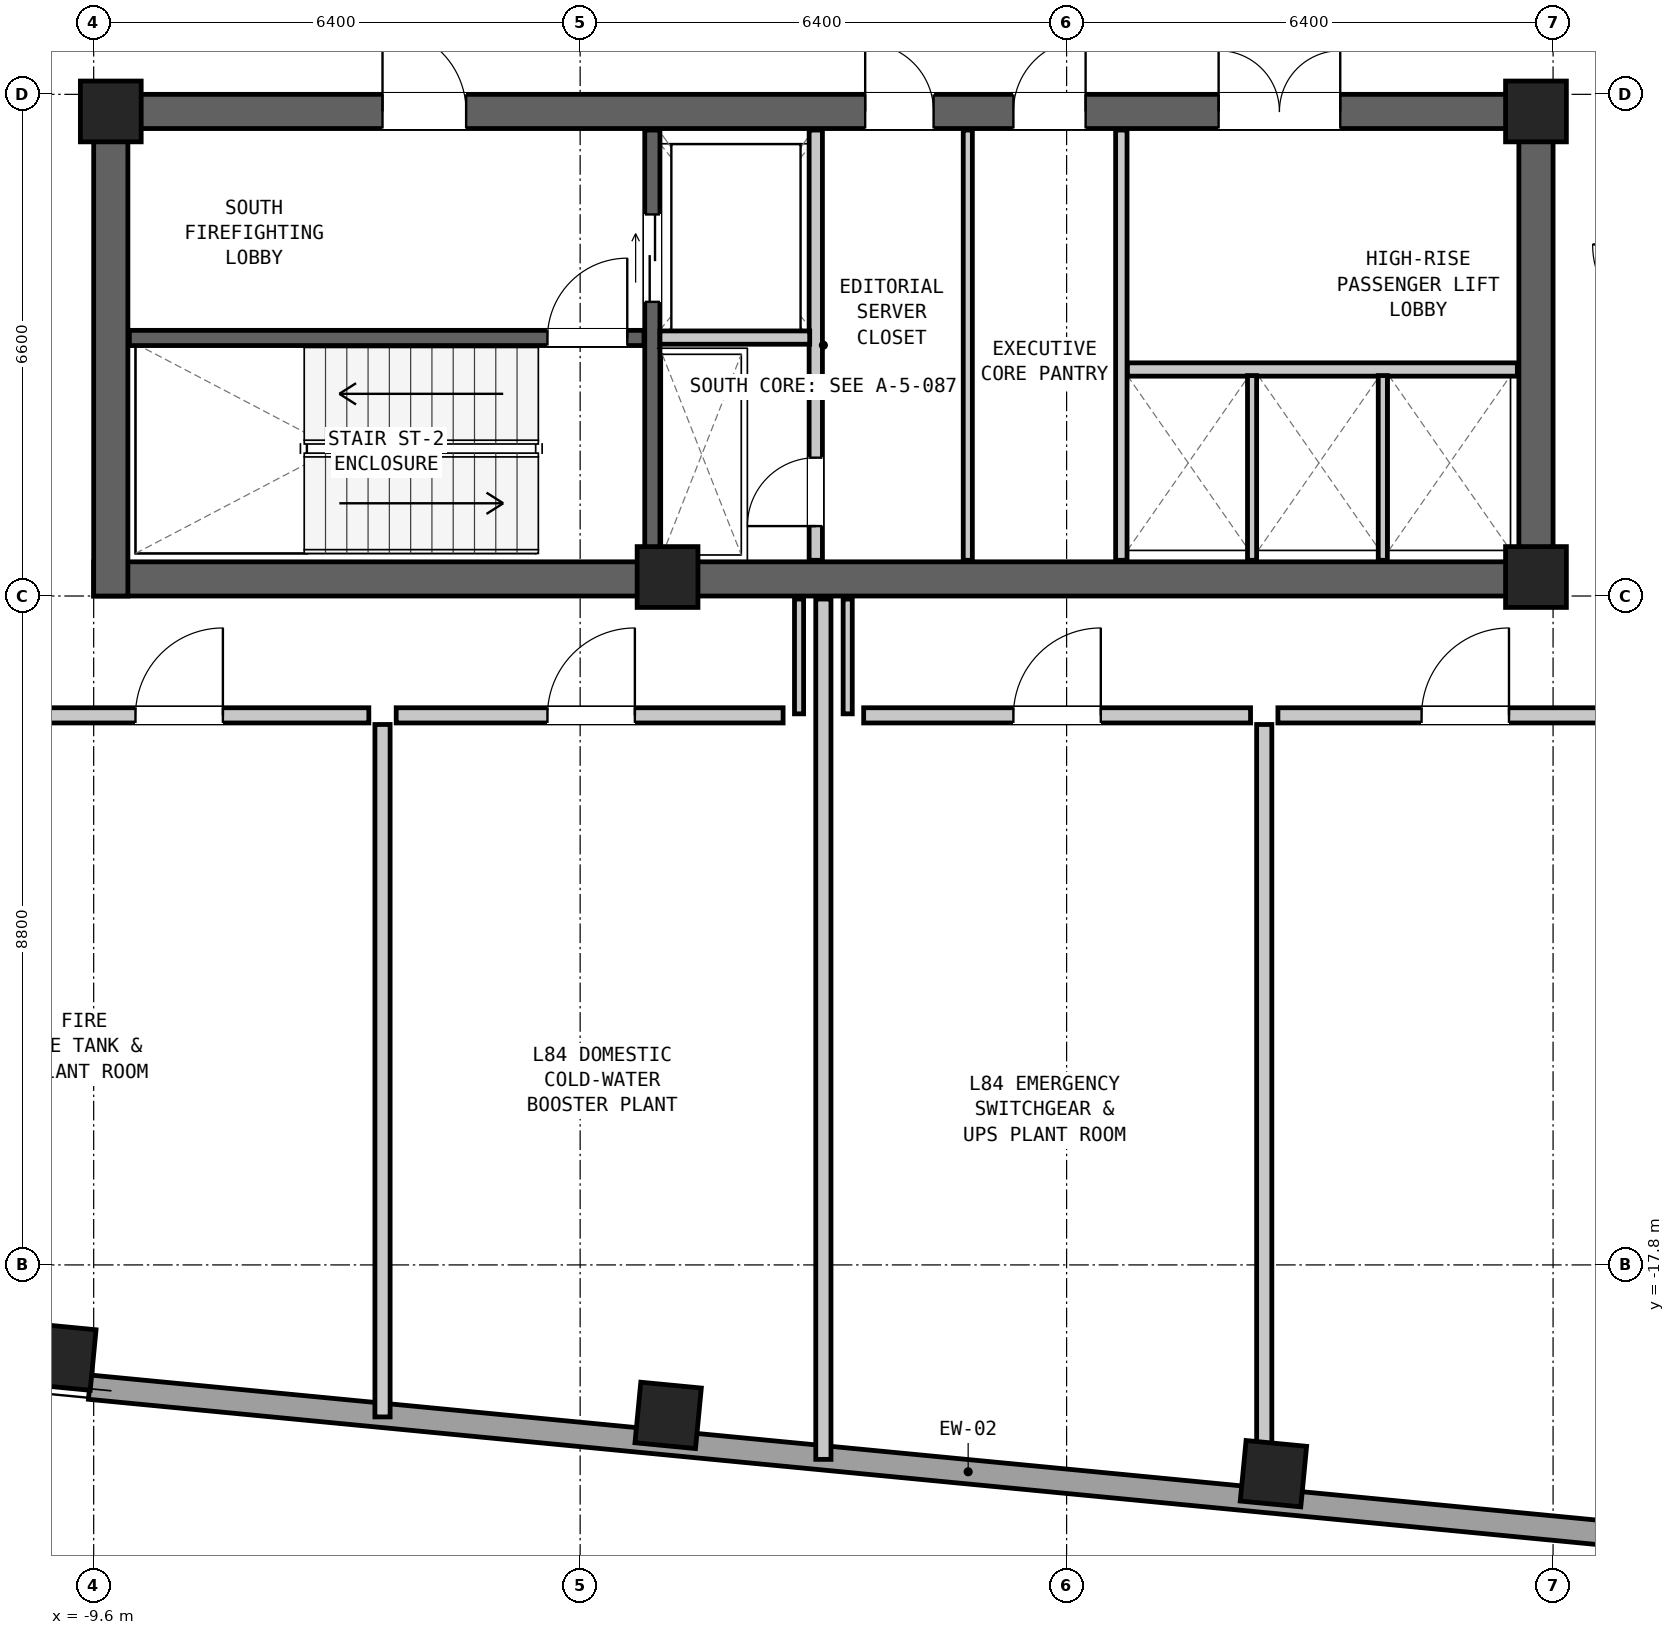
"""IFC4 building model, lengths in metres.
Left out: names, types, materials, properties, quantities, classifications, styles, units other than length and angle.
Written with IfcOpenShell. Run it as: python <this file> out.ifc"""

import sys

from ifc_helpers import new_model, si_unit, direction, frame, frame_2d, origin, origin_2d, place, context, subcontext, project, spatial, rectangle, extrude, element, fill, save


model = new_model("IFC4")
c1 = context("Model", 3, precision=1e-05, world=origin(), true_north=direction((0.0, 1.0)))
c2 = subcontext(c1, "Body", "Model", "MODEL_VIEW")
j1 = project(units=[si_unit("LENGTHUNIT", "METRE"), si_unit("PLANEANGLEUNIT", "RADIAN")], contexts=[c1])
p1 = place(None, origin())
s1 = spatial("IfcSite", under=j1, at=p1, CompositionType="ELEMENT")
p2 = place(p1, origin())
s2 = spatial("IfcBuilding", under=s1, at=p2, CompositionType="ELEMENT")
p3 = place(p2, frame((0.0, 0.0, 284.9)))
s3 = spatial("IfcBuildingStorey", under=s2, at=p3, CompositionType="ELEMENT", Elevation=284.9)
p4 = place(p3, frame((-9.6, -8.775, 0.0), z_axis=(0.0, 0.0, 1.0), x_axis=(1.0, 0.0, 0.0)))
e1 = element("IfcWall", 1, at=p4, inside=s3, PredefinedType="SHEAR", context=c2, shape_type="SweptSolid", body=[
    extrude(rectangle(XDim=19.2, YDim=0.45, at=frame_2d((9.6, 0.0))), origin(), (0.0, 0.0, 1.0), 4.35),
])
p5 = place(p3, frame((-9.6, -2.625, 0.0), z_axis=(0.0, 0.0, 1.0), x_axis=(1.0, 0.0, 0.0)))
e2 = element("IfcWall", 2, at=p5, inside=s3, PredefinedType="SHEAR", context=c2, shape_type="SweptSolid", body=[
    extrude(rectangle(XDim=19.2, YDim=0.45, at=frame_2d((9.6, 0.0))), origin(), (0.0, 0.0, 1.0), 4.35),
])
p6 = place(p5, frame((3.8, 0.0, 0.0)))
e3 = element("IfcOpeningElement", 3, at=p6, cuts=e2, PredefinedType="OPENING", context=c2, shape_type="SweptSolid", body=[
    extrude(rectangle(XDim=1.1, YDim=2.08, at=frame_2d((0.55, 1.04))), frame((0.0, 0.237, 0.0), z_axis=(0.0, -1.0, 0.0), x_axis=(1.0, 0.0, 0.0)), (0.0, 0.0, 1.0), 0.474),
])
p7 = place(p5, frame((10.15, 0.0, 0.0)))
e4 = element("IfcOpeningElement", 4, at=p7, cuts=e2, PredefinedType="OPENING", context=c2, shape_type="SweptSolid", body=[
    extrude(rectangle(XDim=0.9, YDim=2.05, at=frame_2d((0.45, 1.025))), frame((0.0, 0.237, 0.0), z_axis=(0.0, -1.0, 0.0), x_axis=(1.0, 0.0, 0.0)), (0.0, 0.0, 1.0), 0.474),
])
p8 = place(p5, frame((12.1, 0.0, 0.0)))
e5 = element("IfcOpeningElement", 5, at=p8, cuts=e2, PredefinedType="OPENING", context=c2, shape_type="SweptSolid", body=[
    extrude(rectangle(XDim=0.95, YDim=2.1, at=frame_2d((0.475, 1.05))), frame((0.0, 0.237, 0.0), z_axis=(0.0, -1.0, 0.0), x_axis=(1.0, 0.0, 0.0)), (0.0, 0.0, 1.0), 0.474),
])
p9 = place(p5, frame((14.8, 0.0, 0.0)))
e6 = element("IfcOpeningElement", 6, at=p9, cuts=e2, PredefinedType="OPENING", context=c2, shape_type="SweptSolid", body=[
    extrude(rectangle(XDim=1.6, YDim=2.12, at=frame_2d((0.8, 1.06))), frame((0.0, 0.237, 0.0), z_axis=(0.0, -1.0, 0.0), x_axis=(1.0, 0.0, 0.0)), (0.0, 0.0, 1.0), 0.474),
])
for number, where, z_axis, x_axis in (
    (7, (-9.375, -9.0, 0.0), (0.0, 0.0, 1.0), (0.0, 1.0, 0.0)),
    (8, (9.375, -9.0, 0.0), (0.0, 0.0, 1.0), (0.0, 1.0, 0.0)),
):
    element("IfcWall", number, at=place(p3, frame(where, z_axis=z_axis, x_axis=x_axis)), inside=s3, PredefinedType="SHEAR", context=c2, shape_type="SweptSolid", body=[
        extrude(rectangle(XDim=6.6, YDim=0.45, at=frame_2d((3.3, 0.0))), origin(), (0.0, 0.0, 1.0), 4.35),
    ])
for number, where, z_axis, x_axis in (
    (9, (-10.005, -19.013, 0.0), (0.0, 0.0, 1.0), (0.995, -0.096, 0.0)),
    (10, (-2.042, -19.78, 0.0), (0.0, 0.0, 1.0), (0.995, -0.096, 0.0)),
    (11, (5.921, -20.546, 0.0), (0.0, 0.0, 1.0), (0.995, -0.096, 0.0)),
    (12, (-9.375, -2.625, 0.0), (0.0, 0.0, 1.0), (1.0, 0.0, 0.0)),
    (13, (9.375, -2.625, 0.0), (0.0, 0.0, 1.0), (1.0, 0.0, 0.0)),
    (14, (-2.05, -8.75, 0.0), (0.0, 0.0, 1.0), (1.0, 0.0, 0.0)),
    (15, (9.375, -8.75, 0.0), (0.0, 0.0, 1.0), (1.0, 0.0, 0.0)),
):
    element("IfcColumn", number, at=place(p3, frame(where, z_axis=z_axis, x_axis=x_axis)), inside=s3, PredefinedType="COLUMN", context=c2, shape_type="SweptSolid", body=[
        extrude(rectangle(XDim=0.8, YDim=0.8, at=origin_2d()), origin(), (0.0, 0.0, 1.0), 4.35),
    ])
p10 = place(p3, frame((13.463, -21.635, 0.0), z_axis=(0.0, 0.0, 1.0), x_axis=(-0.995395614039, 0.095851820809, 0.0)))
e16 = element("IfcWall", 16, at=p10, inside=s3, PredefinedType="SOLIDWALL", context=c2, shape_type="SweptSolid", body=[
    extrude(rectangle(XDim=23.224, YDim=0.32, at=frame_2d((11.612, 0.0))), origin(), (0.0, 0.0, 1.0), 2.25),
])
p11 = place(p3, frame((-9.13, -5.605, 0.0), z_axis=(0.0, 0.0, 1.0), x_axis=(1.0, 0.0, 0.0)))
e17 = element("IfcWall", 17, at=p11, inside=s3, PredefinedType="SHEAR", context=c2, shape_type="SweptSolid", body=[
    extrude(rectangle(XDim=6.77, YDim=0.2, at=frame_2d((3.385, 0.0))), origin(), (0.0, 0.0, 1.0), 4.07),
])
p12 = place(p11, frame((5.5, 0.0, 0.0)))
e18 = element("IfcOpeningElement", 18, at=p12, cuts=e17, PredefinedType="OPENING", context=c2, shape_type="SweptSolid", body=[
    extrude(rectangle(XDim=1.05, YDim=2.08, at=frame_2d((0.525, 1.04))), frame((0.0, 0.112, 0.0), z_axis=(0.0, -1.0, 0.0), x_axis=(1.0, 0.0, 0.0)), (0.0, 0.0, 1.0), 0.224),
])
p13 = place(p3, frame((-2.25, -8.53, 0.0), z_axis=(0.0, 0.0, 1.0), x_axis=(0.0, 1.0, 0.0)))
e19 = element("IfcWall", 19, at=p13, inside=s3, PredefinedType="SHEAR", context=c2, shape_type="SweptSolid", body=[
    extrude(rectangle(XDim=5.66, YDim=0.2, at=frame_2d((2.83, 0.0))), origin(), (0.0, 0.0, 1.0), 4.07),
])
p14 = place(p13, frame((3.4, 0.0, 0.0)))
e20 = element("IfcOpeningElement", 20, at=p14, cuts=e19, PredefinedType="OPENING", context=c2, shape_type="SweptSolid", body=[
    extrude(rectangle(XDim=1.15, YDim=2.08, at=frame_2d((0.575, 1.04))), frame((0.0, 0.112, 0.0), z_axis=(0.0, -1.0, 0.0), x_axis=(1.0, 0.0, 0.0)), (0.0, 0.0, 1.0), 0.224),
])
p15 = place(p3, frame((-0.1, -8.53, 0.0), z_axis=(0.0, 0.0, 1.0), x_axis=(0.0, 1.0, 0.0)))
e21 = element("IfcWall", 21, at=p15, inside=s3, PredefinedType="PARTITIONING", context=c2, shape_type="SweptSolid", body=[
    extrude(rectangle(XDim=5.66, YDim=0.175, at=frame_2d((2.83, 0.0))), origin(), (0.0, 0.0, 1.0), 4.07),
])
p16 = place(p15, frame((0.45, 0.0, 0.0)))
e22 = element("IfcOpeningElement", 22, at=p16, cuts=e21, PredefinedType="OPENING", context=c2, shape_type="SweptSolid", body=[
    extrude(rectangle(XDim=0.9, YDim=2.05, at=frame_2d((0.45, 1.025))), frame((0.0, 0.1, 0.0), z_axis=(0.0, -1.0, 0.0), x_axis=(1.0, 0.0, 0.0)), (0.0, 0.0, 1.0), 0.199),
])
p17 = place(p3, frame((-2.15, -5.6, 0.0), z_axis=(0.0, 0.0, 1.0), x_axis=(1.0, 0.0, 0.0)))
e23 = element("IfcWall", 23, at=p17, inside=s3, PredefinedType="PARTITIONING", context=c2, shape_type="SweptSolid", body=[
    extrude(rectangle(XDim=1.97, YDim=0.175, at=frame_2d((0.985, 0.0))), origin(), (0.0, 0.0, 1.0), 4.07),
])
p18 = place(p3, frame((3.92, -8.53, 0.0), z_axis=(0.0, 0.0, 1.0), x_axis=(0.0, 1.0, 0.0)))
e24 = element("IfcWall", 24, at=p18, inside=s3, PredefinedType="PARTITIONING", context=c2, shape_type="SweptSolid", body=[
    extrude(rectangle(XDim=5.66, YDim=0.15, at=frame_2d((2.83, 0.0))), origin(), (0.0, 0.0, 1.0), 4.07),
])
p19 = place(p3, frame((1.9, -8.53, 0.0), z_axis=(0.0, 0.0, 1.0), x_axis=(0.0, 1.0, 0.0)))
e25 = element("IfcWall", 25, at=p19, inside=s3, PredefinedType="PARTITIONING", context=c2, shape_type="SweptSolid", body=[
    extrude(rectangle(XDim=5.66, YDim=0.12, at=frame_2d((2.83, 0.0))), origin(), (0.0, 0.0, 1.0), 4.07),
])
p20 = place(p3, frame((4.0, -6.02, 0.0), z_axis=(0.0, 0.0, 1.0), x_axis=(1.0, 0.0, 0.0)))
e26 = element("IfcWall", 26, at=p20, inside=s3, PredefinedType="PARTITIONING", context=c2, shape_type="SweptSolid", body=[
    extrude(rectangle(XDim=5.13, YDim=0.175, at=frame_2d((2.565, 0.0))), origin(), (0.0, 0.0, 1.0), 4.07),
])
for number, where, z_axis, x_axis in (
    (27, (5.64, -8.53, 0.0), (0.0, 0.0, 1.0), (0.0, 1.0, 0.0)),
    (28, (7.36, -8.53, 0.0), (0.0, 0.0, 1.0), (0.0, 1.0, 0.0)),
):
    element("IfcWall", number, at=place(p3, frame(where, z_axis=z_axis, x_axis=x_axis)), inside=s3, PredefinedType="PARTITIONING", context=c2, shape_type="SweptSolid", body=[
        extrude(rectangle(XDim=2.43, YDim=0.12, at=frame_2d((1.215, 0.0))), origin(), (0.0, 0.0, 1.0), 4.07),
    ])
p21 = place(p3, frame((0.0, -20.358, 0.0), z_axis=(0.0, 0.0, 1.0), x_axis=(0.0, 1.0, 0.0)))
e29 = element("IfcWall", 29, at=p21, inside=s3, PredefinedType="PARTITIONING", context=c2, shape_type="SweptSolid", body=[
    extrude(rectangle(XDim=11.318, YDim=0.2, at=frame_2d((5.659, 0.0))), origin(), (0.0, 0.0, 1.0), 2.25),
])
for number, where, z_axis, x_axis in (
    (30, (-0.32, -10.55, 0.0), (0.0, 0.0, 1.0), (0.0, 1.0, 0.0)),
    (31, (0.32, -10.55, 0.0), (0.0, 0.0, 1.0), (0.0, 1.0, 0.0)),
):
    element("IfcWall", number, at=place(p3, frame(where, z_axis=z_axis, x_axis=x_axis)), inside=s3, PredefinedType="PARTITIONING", context=c2, shape_type="SweptSolid", body=[
        extrude(rectangle(XDim=1.51, YDim=0.12, at=frame_2d((0.755, 0.0))), origin(), (0.0, 0.0, 1.0), 2.25),
    ])
p22 = place(p3, frame((-10.97, -10.57, 0.0), z_axis=(0.0, 0.0, 1.0), x_axis=(1.0, 0.0, 0.0)))
e32 = element("IfcWall", 32, at=p22, inside=s3, PredefinedType="PARTITIONING", context=c2, shape_type="SweptSolid", body=[
    extrude(rectangle(XDim=4.99, YDim=0.2, at=frame_2d((2.495, 0.0))), origin(), (0.0, 0.0, 1.0), 4.07),
])
p23 = place(p22, frame((1.92, 0.0, 0.0)))
e33 = element("IfcOpeningElement", 33, at=p23, cuts=e32, PredefinedType="OPENING", context=c2, shape_type="SweptSolid", body=[
    extrude(rectangle(XDim=1.15, YDim=2.1, at=frame_2d((0.575, 1.05))), frame((0.0, 0.112, 0.0), z_axis=(0.0, -1.0, 0.0), x_axis=(1.0, 0.0, 0.0)), (0.0, 0.0, 1.0), 0.224),
])
p24 = place(p3, frame((-5.8, -19.8, 0.0), z_axis=(0.0, 0.0, 1.0), x_axis=(0.0, 1.0, 0.0)))
e34 = element("IfcWall", 34, at=p24, inside=s3, PredefinedType="PARTITIONING", context=c2, shape_type="SweptSolid", body=[
    extrude(rectangle(XDim=9.11, YDim=0.2, at=frame_2d((4.555, 0.0))), origin(), (0.0, 0.0, 1.0), 3.288),
])
p25 = place(p3, frame((-5.62, -10.57, 0.0), z_axis=(0.0, 0.0, 1.0), x_axis=(1.0, 0.0, 0.0)))
e35 = element("IfcWall", 35, at=p25, inside=s3, PredefinedType="PARTITIONING", context=c2, shape_type="SweptSolid", body=[
    extrude(rectangle(XDim=5.09, YDim=0.2, at=frame_2d((2.545, 0.0))), origin(), (0.0, 0.0, 1.0), 4.07),
])
p26 = place(p25, frame((1.99, 0.0, 0.0)))
e36 = element("IfcOpeningElement", 36, at=p26, cuts=e35, PredefinedType="OPENING", context=c2, shape_type="SweptSolid", body=[
    extrude(rectangle(XDim=1.15, YDim=2.1, at=frame_2d((0.575, 1.05))), frame((0.0, 0.112, 0.0), z_axis=(0.0, -1.0, 0.0), x_axis=(1.0, 0.0, 0.0)), (0.0, 0.0, 1.0), 0.224),
])
p27 = place(p3, frame((0.53, -10.57, 0.0), z_axis=(0.0, 0.0, 1.0), x_axis=(1.0, 0.0, 0.0)))
e37 = element("IfcWall", 37, at=p27, inside=s3, PredefinedType="PARTITIONING", context=c2, shape_type="SweptSolid", body=[
    extrude(rectangle(XDim=5.09, YDim=0.2, at=frame_2d((2.545, 0.0))), origin(), (0.0, 0.0, 1.0), 4.07),
])
p28 = place(p27, frame((1.97, 0.0, 0.0)))
e38 = element("IfcOpeningElement", 38, at=p28, cuts=e37, PredefinedType="OPENING", context=c2, shape_type="SweptSolid", body=[
    extrude(rectangle(XDim=1.15, YDim=2.1, at=frame_2d((0.575, 1.05))), frame((0.0, 0.112, 0.0), z_axis=(0.0, -1.0, 0.0), x_axis=(1.0, 0.0, 0.0)), (0.0, 0.0, 1.0), 0.224),
])
p29 = place(p3, frame((5.8, -20.917, 0.0), z_axis=(0.0, 0.0, 1.0), x_axis=(0.0, 1.0, 0.0)))
e39 = element("IfcWall", 39, at=p29, inside=s3, PredefinedType="PARTITIONING", context=c2, shape_type="SweptSolid", body=[
    extrude(rectangle(XDim=10.227, YDim=0.2, at=frame_2d((5.113, 0.0))), origin(), (0.0, 0.0, 1.0), 2.25),
])
p30 = place(p3, frame((5.98, -10.57, 0.0), z_axis=(0.0, 0.0, 1.0), x_axis=(1.0, 0.0, 0.0)))
e40 = element("IfcWall", 40, at=p30, inside=s3, PredefinedType="PARTITIONING", context=c2, shape_type="SweptSolid", body=[
    extrude(rectangle(XDim=4.99, YDim=0.2, at=frame_2d((2.495, 0.0))), origin(), (0.0, 0.0, 1.0), 4.07),
])
p31 = place(p30, frame((1.89, 0.0, 0.0)))
e41 = element("IfcOpeningElement", 41, at=p31, cuts=e40, PredefinedType="OPENING", context=c2, shape_type="SweptSolid", body=[
    extrude(rectangle(XDim=1.15, YDim=2.1, at=frame_2d((0.575, 1.05))), frame((0.0, 0.112, 0.0), z_axis=(0.0, -1.0, 0.0), x_axis=(1.0, 0.0, 0.0)), (0.0, 0.0, 1.0), 0.224),
])
p32 = place(p12, origin())
e42 = element("IfcDoor", 42, at=p32, inside=s3, OperationType="SINGLE_SWING_RIGHT", PredefinedType="DOOR", context=c2, shape_type="SweptSolid", body=[
    extrude(rectangle(XDim=1.05, YDim=2.08, at=frame_2d((0.525, 1.04))), frame((0.0, 0.025, 0.0), z_axis=(0.0, -1.0, 0.0), x_axis=(1.0, 0.0, 0.0)), (0.0, 0.0, 1.0), 0.05),
])
fill(e18, e42)
p33 = place(p6, origin())
e43 = element("IfcDoor", 43, at=p33, inside=s3, OperationType="SINGLE_SWING_LEFT", PredefinedType="DOOR", context=c2, shape_type="SweptSolid", body=[
    extrude(rectangle(XDim=1.1, YDim=2.08, at=frame_2d((0.55, 1.04))), frame((0.0, 0.025, 0.0), z_axis=(0.0, -1.0, 0.0), x_axis=(1.0, 0.0, 0.0)), (0.0, 0.0, 1.0), 0.05),
])
fill(e3, e43)
p34 = place(p14, origin())
e44 = element("IfcDoor", 44, at=p34, inside=s3, OperationType="DOUBLE_DOOR_SLIDING", PredefinedType="DOOR", context=c2, shape_type="SweptSolid", body=[
    extrude(rectangle(XDim=1.15, YDim=2.08, at=frame_2d((0.575, 1.04))), frame((0.0, 0.025, 0.0), z_axis=(0.0, -1.0, 0.0), x_axis=(1.0, 0.0, 0.0)), (0.0, 0.0, 1.0), 0.05),
])
fill(e20, e44)
p35 = place(p16, origin())
e45 = element("IfcDoor", 45, at=p35, inside=s3, OperationType="SINGLE_SWING_LEFT", PredefinedType="DOOR", context=c2, shape_type="SweptSolid", body=[
    extrude(rectangle(XDim=0.9, YDim=2.05, at=frame_2d((0.45, 1.025))), frame((0.0, 0.025, 0.0), z_axis=(0.0, -1.0, 0.0), x_axis=(1.0, 0.0, 0.0)), (0.0, 0.0, 1.0), 0.05),
])
fill(e22, e45)
p36 = place(p7, origin())
e46 = element("IfcDoor", 46, at=p36, inside=s3, OperationType="SINGLE_SWING_LEFT", PredefinedType="DOOR", context=c2, shape_type="SweptSolid", body=[
    extrude(rectangle(XDim=0.9, YDim=2.05, at=frame_2d((0.45, 1.025))), frame((0.0, 0.025, 0.0), z_axis=(0.0, -1.0, 0.0), x_axis=(1.0, 0.0, 0.0)), (0.0, 0.0, 1.0), 0.05),
])
fill(e4, e46)
p37 = place(p8, origin())
e47 = element("IfcDoor", 47, at=p37, inside=s3, OperationType="SINGLE_SWING_RIGHT", PredefinedType="DOOR", context=c2, shape_type="SweptSolid", body=[
    extrude(rectangle(XDim=0.95, YDim=2.1, at=frame_2d((0.475, 1.05))), frame((0.0, 0.025, 0.0), z_axis=(0.0, -1.0, 0.0), x_axis=(1.0, 0.0, 0.0)), (0.0, 0.0, 1.0), 0.05),
])
fill(e5, e47)
p38 = place(p9, origin())
e48 = element("IfcDoor", 48, at=p38, inside=s3, OperationType="DOUBLE_DOOR_SINGLE_SWING", PredefinedType="DOOR", context=c2, shape_type="SweptSolid", body=[
    extrude(rectangle(XDim=1.6, YDim=2.12, at=frame_2d((0.8, 1.06))), frame((0.0, 0.025, 0.0), z_axis=(0.0, -1.0, 0.0), x_axis=(1.0, 0.0, 0.0)), (0.0, 0.0, 1.0), 0.05),
])
fill(e6, e48)
p39 = place(p23, origin())
e49 = element("IfcDoor", 49, at=p39, inside=s3, OperationType="SINGLE_SWING_RIGHT", PredefinedType="DOOR", context=c2, shape_type="SweptSolid", body=[
    extrude(rectangle(XDim=1.15, YDim=2.1, at=frame_2d((0.575, 1.05))), frame((0.0, 0.025, 0.0), z_axis=(0.0, -1.0, 0.0), x_axis=(1.0, 0.0, 0.0)), (0.0, 0.0, 1.0), 0.05),
])
fill(e33, e49)
p40 = place(p26, origin())
e50 = element("IfcDoor", 50, at=p40, inside=s3, OperationType="SINGLE_SWING_RIGHT", PredefinedType="DOOR", context=c2, shape_type="SweptSolid", body=[
    extrude(rectangle(XDim=1.15, YDim=2.1, at=frame_2d((0.575, 1.05))), frame((0.0, 0.025, 0.0), z_axis=(0.0, -1.0, 0.0), x_axis=(1.0, 0.0, 0.0)), (0.0, 0.0, 1.0), 0.05),
])
fill(e36, e50)
p41 = place(p28, origin())
e51 = element("IfcDoor", 51, at=p41, inside=s3, OperationType="SINGLE_SWING_RIGHT", PredefinedType="DOOR", context=c2, shape_type="SweptSolid", body=[
    extrude(rectangle(XDim=1.15, YDim=2.1, at=frame_2d((0.575, 1.05))), frame((0.0, 0.025, 0.0), z_axis=(0.0, -1.0, 0.0), x_axis=(1.0, 0.0, 0.0)), (0.0, 0.0, 1.0), 0.05),
])
fill(e38, e51)
p42 = place(p31, origin())
e52 = element("IfcDoor", 52, at=p42, inside=s3, OperationType="SINGLE_SWING_RIGHT", PredefinedType="DOOR", context=c2, shape_type="SweptSolid", body=[
    extrude(rectangle(XDim=1.15, YDim=2.1, at=frame_2d((0.575, 1.05))), frame((0.0, 0.025, 0.0), z_axis=(0.0, -1.0, 0.0), x_axis=(1.0, 0.0, 0.0)), (0.0, 0.0, 1.0), 0.05),
])
fill(e41, e52)
save(model, sys.argv[1])
